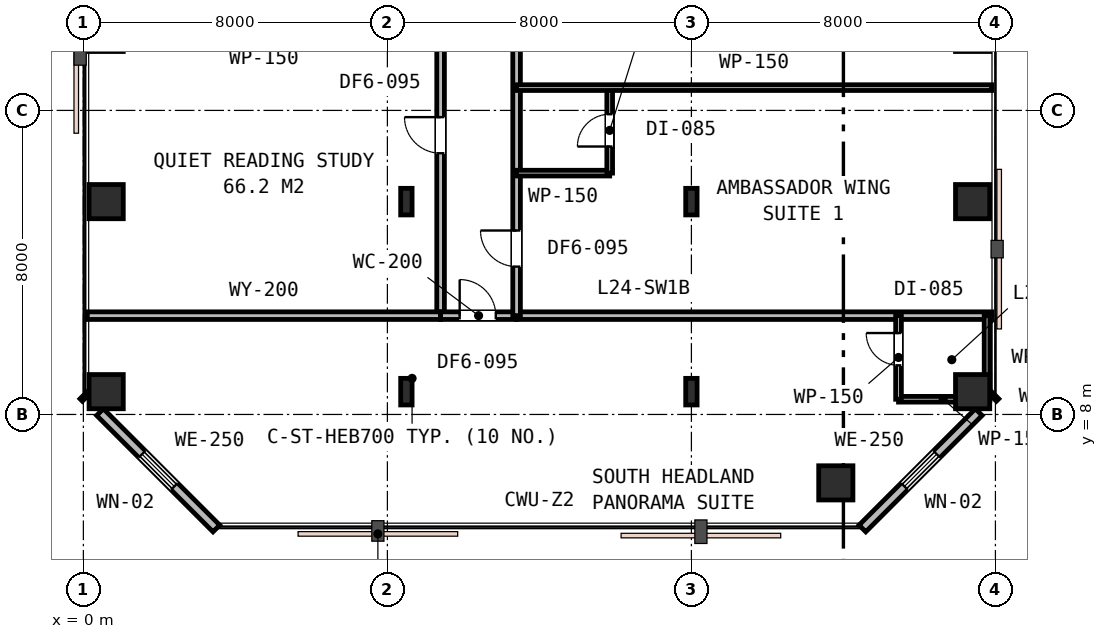
"""IFC4 building model, lengths in metres.
Left out: names, types, materials, properties, quantities, classifications, styles, units other than length and angle.
Written with IfcOpenShell. Run it as: python <this file> out.ifc"""

import sys

from ifc_helpers import new_model, si_unit, direction, frame, frame_2d, origin, origin_2d, place, context, subcontext, project, spatial, rectangle, i_section, extrude, element, fill, save


model = new_model("IFC4")
c1 = context("Model", 3, precision=1e-05, world=origin(), true_north=direction((0.0, 1.0)))
c2 = subcontext(c1, "Body", "Model", "MODEL_VIEW")
j1 = project(units=[si_unit("LENGTHUNIT", "METRE"), si_unit("PLANEANGLEUNIT", "RADIAN")], contexts=[c1])
p1 = place(None, origin())
s1 = spatial("IfcSite", under=j1, at=p1, CompositionType="ELEMENT")
p2 = place(p1, origin())
s2 = spatial("IfcBuilding", under=s1, at=p2, CompositionType="ELEMENT")
p3 = place(p2, frame((0.0, 0.0, 97.2)))
s3 = spatial("IfcBuildingStorey", under=s2, at=p3, CompositionType="ELEMENT", Elevation=97.2)
for number, where, z_axis, x_axis in (
    (1, (0.6, 8.6, 0.0), (0.0, 0.0, 1.0), (1.0, 0.0, 0.0)),
    (2, (0.6, 13.6, 0.0), (0.0, 0.0, 1.0), (1.0, 0.0, 0.0)),
    (3, (19.8, 6.2, 0.0), (0.0, 0.0, 1.0), (1.0, 0.0, 0.0)),
    (4, (23.4, 8.6, 0.0), (0.0, 0.0, 1.0), (1.0, 0.0, 0.0)),
    (5, (23.4, 13.6, 0.0), (0.0, 0.0, 1.0), (1.0, 0.0, 0.0)),
):
    element("IfcColumn", number, at=place(p3, frame(where, z_axis=z_axis, x_axis=x_axis)), inside=s3, PredefinedType="COLUMN", context=c2, shape_type="SweptSolid", body=[
        extrude(rectangle(XDim=0.9, YDim=0.9, at=origin_2d()), origin(), (0.0, 0.0, 1.0), 3.6),
    ])
for number, where, z_axis, x_axis in (
    (6, (8.5, 8.6, 0.0), (0.0, 0.0, 1.0), (1.0, 0.0, 0.0)),
    (7, (16.0, 8.6, 0.0), (0.0, 0.0, 1.0), (1.0, 0.0, 0.0)),
    (8, (8.5, 13.6, 0.0), (0.0, 0.0, 1.0), (1.0, 0.0, 0.0)),
    (9, (16.0, 13.6, 0.0), (0.0, 0.0, 1.0), (1.0, 0.0, 0.0)),
):
    element("IfcColumn", number, at=place(p3, frame(where, z_axis=z_axis, x_axis=x_axis)), inside=s3, PredefinedType="COLUMN", context=c2, shape_type="SweptSolid", body=[
        extrude(i_section(OverallWidth=0.3, OverallDepth=0.7, WebThickness=0.017, FlangeThickness=0.032, FilletRadius=0.027, at=origin_2d()), origin(), (0.0, 0.0, 1.0), 3.6),
    ])
p4 = place(p3, frame((20.5, 5.0, 0.0), z_axis=(0.0, 0.0, 1.0), x_axis=(0.707106781187, 0.707106781187, 0.0)))
e10 = element("IfcWall", 10, at=p4, inside=s3, PredefinedType="STANDARD", context=c2, shape_type="SweptSolid", body=[
    extrude(rectangle(XDim=4.33, YDim=0.25, at=frame_2d((2.165, 0.0))), origin(), (0.0, 0.0, 1.0), 3.33),
])
p5 = place(p4, frame((1.565, 0.0, 0.85)))
e11 = element("IfcOpeningElement", 11, at=p5, cuts=e10, PredefinedType="OPENING", context=c2, shape_type="SweptSolid", body=[
    extrude(rectangle(XDim=1.2, YDim=1.6, at=frame_2d((0.6, 0.8))), frame((0.0, 0.135, 0.0), z_axis=(0.0, -1.0, 0.0), x_axis=(1.0, 0.0, 0.0)), (0.0, 0.0, 1.0), 0.27),
])
for number, where, z_axis, x_axis in (
    (12, (23.938, 8.438, 0.0), (0.0, 0.0, 1.0), (0.707, 0.707, 0.0)),
    (13, (0.0, 8.5, 0.0), (0.0, 0.0, 1.0), (0.707, -0.707, 0.0)),
):
    element("IfcWall", number, at=place(p3, frame(where, z_axis=z_axis, x_axis=x_axis)), inside=s3, PredefinedType="STANDARD", context=c2, shape_type="SweptSolid", body=[
        extrude(rectangle(XDim=0.087, YDim=0.25, at=frame_2d((0.044, 0.0))), origin(), (0.0, 0.0, 1.0), 3.33),
    ])
p6 = place(p3, frame((0.438, 8.062, 0.0), z_axis=(0.0, 0.0, 1.0), x_axis=(0.707106781187, -0.707106781187, 0.0)))
e14 = element("IfcWall", 14, at=p6, inside=s3, PredefinedType="STANDARD", context=c2, shape_type="SweptSolid", body=[
    extrude(rectangle(XDim=4.33, YDim=0.25, at=frame_2d((2.165, 0.0))), origin(), (0.0, 0.0, 1.0), 3.33),
])
p7 = place(p6, frame((1.565, 0.0, 0.85)))
e15 = element("IfcOpeningElement", 15, at=p7, cuts=e14, PredefinedType="OPENING", context=c2, shape_type="SweptSolid", body=[
    extrude(rectangle(XDim=1.2, YDim=1.6, at=frame_2d((0.6, 0.8))), frame((0.0, 0.135, 0.0), z_axis=(0.0, -1.0, 0.0), x_axis=(1.0, 0.0, 0.0)), (0.0, 0.0, 1.0), 0.27),
])
p8 = place(p3, frame((9.4, 10.6, 0.0), z_axis=(0.0, 0.0, 1.0), x_axis=(0.0, 1.0, 0.0)))
e16 = element("IfcWall", 16, at=p8, inside=s3, PredefinedType="PARTITIONING", context=c2, shape_type="SweptSolid", body=[
    extrude(rectangle(XDim=30.9, YDim=0.2, at=frame_2d((15.45, 0.0))), origin(), (0.0, 0.0, 1.0), 2.83),
])
p9 = place(p8, frame((8.679, 0.0, 0.0)))
e17 = element("IfcOpeningElement", 17, at=p9, cuts=e16, PredefinedType="OPENING", context=c2, shape_type="SweptSolid", body=[
    extrude(rectangle(XDim=0.95, YDim=2.15, at=frame_2d((0.475, 1.075))), frame((0.0, 0.11, 0.0), z_axis=(0.0, -1.0, 0.0), x_axis=(1.0, 0.0, 0.0)), (0.0, 0.0, 1.0), 0.22),
])
p10 = place(p8, frame((14.68, 0.0, 0.0)))
e18 = element("IfcOpeningElement", 18, at=p10, cuts=e16, PredefinedType="OPENING", context=c2, shape_type="SweptSolid", body=[
    extrude(rectangle(XDim=0.95, YDim=2.15, at=frame_2d((0.475, 1.075))), frame((0.0, 0.11, 0.0), z_axis=(0.0, -1.0, 0.0), x_axis=(1.0, 0.0, 0.0)), (0.0, 0.0, 1.0), 0.22),
])
p11 = place(p8, frame((4.273, 0.0, 0.0)))
e19 = element("IfcOpeningElement", 19, at=p11, cuts=e16, PredefinedType="OPENING", context=c2, shape_type="SweptSolid", body=[
    extrude(rectangle(XDim=0.95, YDim=2.15, at=frame_2d((0.475, 1.075))), frame((0.0, 0.11, 0.0), z_axis=(0.0, -1.0, 0.0), x_axis=(1.0, 0.0, 0.0)), (0.0, 0.0, 1.0), 0.22),
])
p12 = place(p8, frame((25.745, 0.0, 0.0)))
e20 = element("IfcOpeningElement", 20, at=p12, cuts=e16, PredefinedType="OPENING", context=c2, shape_type="SweptSolid", body=[
    extrude(rectangle(XDim=0.95, YDim=2.15, at=frame_2d((0.475, 1.075))), frame((0.0, 0.11, 0.0), z_axis=(0.0, -1.0, 0.0), x_axis=(1.0, 0.0, 0.0)), (0.0, 0.0, 1.0), 0.22),
])
p13 = place(p3, frame((0.1, 10.6, 0.0), z_axis=(0.0, 0.0, 1.0), x_axis=(1.0, 0.0, 0.0)))
e21 = element("IfcWall", 21, at=p13, inside=s3, PredefinedType="PARTITIONING", context=c2, shape_type="SweptSolid", body=[
    extrude(rectangle(XDim=9.3, YDim=0.2, at=frame_2d((4.65, 0.0))), origin(), (0.0, 0.0, 1.0), 2.83),
])
p14 = place(p3, frame((11.4, 10.6, 0.0), z_axis=(0.0, 0.0, 1.0), x_axis=(1.0, 0.0, 0.0)))
e22 = element("IfcWall", 22, at=p14, inside=s3, PredefinedType="PARTITIONING", context=c2, shape_type="SweptSolid", body=[
    extrude(rectangle(XDim=12.5, YDim=0.2, at=frame_2d((6.25, 0.0))), origin(), (0.0, 0.0, 1.0), 2.83),
])
p15 = place(p3, frame((9.4, 10.6, 0.0), z_axis=(0.0, 0.0, 1.0), x_axis=(1.0, 0.0, 0.0)))
e23 = element("IfcWall", 23, at=p15, inside=s3, PredefinedType="PARTITIONING", context=c2, shape_type="SweptSolid", body=[
    extrude(rectangle(XDim=2.0, YDim=0.2, at=frame_2d((1.0, 0.0))), origin(), (0.0, 0.0, 1.0), 3.02),
])
p16 = place(p15, frame((0.502, 0.0, 0.0)))
e24 = element("IfcOpeningElement", 24, at=p16, cuts=e23, PredefinedType="OPENING", context=c2, shape_type="SweptSolid", body=[
    extrude(rectangle(XDim=0.95, YDim=2.15, at=frame_2d((0.475, 1.075))), frame((0.0, 0.11, 0.0), z_axis=(0.0, -1.0, 0.0), x_axis=(1.0, 0.0, 0.0)), (0.0, 0.0, 1.0), 0.22),
])
p17 = place(p3, frame((21.45, 8.4, 0.0), z_axis=(0.0, 0.0, 1.0), x_axis=(1.0, 0.0, 0.0)))
e25 = element("IfcWall", 25, at=p17, inside=s3, PredefinedType="PARTITIONING", context=c2, shape_type="SweptSolid", body=[
    extrude(rectangle(XDim=2.35, YDim=0.15, at=frame_2d((1.175, 0.0))), origin(), (0.0, 0.0, 1.0), 2.83),
])
p18 = place(p3, frame((21.45, 8.4, 0.0), z_axis=(0.0, 0.0, 1.0), x_axis=(0.0, 1.0, 0.0)))
e26 = element("IfcWall", 26, at=p18, inside=s3, PredefinedType="PARTITIONING", context=c2, shape_type="SweptSolid", body=[
    extrude(rectangle(XDim=2.2, YDim=0.15, at=frame_2d((1.1, 0.0))), origin(), (0.0, 0.0, 1.0), 2.83),
])
p19 = place(p18, frame((0.892, 0.0, 0.0)))
e27 = element("IfcOpeningElement", 27, at=p19, cuts=e26, PredefinedType="OPENING", context=c2, shape_type="SweptSolid", body=[
    extrude(rectangle(XDim=0.85, YDim=2.15, at=frame_2d((0.425, 1.075))), frame((0.0, 0.085, 0.0), z_axis=(0.0, -1.0, 0.0), x_axis=(1.0, 0.0, 0.0)), (0.0, 0.0, 1.0), 0.17),
])
p20 = place(p3, frame((23.78, 10.6, 0.0), z_axis=(0.0, 0.0, 1.0), x_axis=(0.0, -1.0, 0.0)))
e28 = element("IfcWall", 28, at=p20, inside=s3, PredefinedType="PARTITIONING", context=c2, shape_type="SweptSolid", body=[
    extrude(rectangle(XDim=2.22, YDim=0.15, at=frame_2d((1.11, 0.0))), origin(), (0.0, 0.0, 1.0), 2.83),
])
p21 = place(p3, frame((11.4, 10.6, 0.0), z_axis=(0.0, 0.0, 1.0), x_axis=(0.0, 1.0, 0.0)))
e29 = element("IfcWall", 29, at=p21, inside=s3, PredefinedType="PARTITIONING", context=c2, shape_type="SweptSolid", body=[
    extrude(rectangle(XDim=18.0, YDim=0.2, at=frame_2d((9.0, 0.0))), origin(), (0.0, 0.0, 1.0), 2.83),
])
p22 = place(p21, frame((1.29, 0.0, 0.0)))
e30 = element("IfcOpeningElement", 30, at=p22, cuts=e29, PredefinedType="OPENING", context=c2, shape_type="SweptSolid", body=[
    extrude(rectangle(XDim=0.95, YDim=2.15, at=frame_2d((0.475, 1.075))), frame((0.0, 0.11, 0.0), z_axis=(0.0, -1.0, 0.0), x_axis=(1.0, 0.0, 0.0)), (0.0, 0.0, 1.0), 0.22),
])
p23 = place(p21, frame((7.29, 0.0, 0.0)))
e31 = element("IfcOpeningElement", 31, at=p23, cuts=e29, PredefinedType="OPENING", context=c2, shape_type="SweptSolid", body=[
    extrude(rectangle(XDim=0.95, YDim=2.15, at=frame_2d((0.475, 1.075))), frame((0.0, 0.11, 0.0), z_axis=(0.0, -1.0, 0.0), x_axis=(1.0, 0.0, 0.0)), (0.0, 0.0, 1.0), 0.22),
])
p24 = place(p21, frame((13.29, 0.0, 0.0)))
e32 = element("IfcOpeningElement", 32, at=p24, cuts=e29, PredefinedType="OPENING", context=c2, shape_type="SweptSolid", body=[
    extrude(rectangle(XDim=0.95, YDim=2.15, at=frame_2d((0.475, 1.075))), frame((0.0, 0.11, 0.0), z_axis=(0.0, -1.0, 0.0), x_axis=(1.0, 0.0, 0.0)), (0.0, 0.0, 1.0), 0.22),
])
p25 = place(p3, frame((11.4, 14.35, 0.0), z_axis=(0.0, 0.0, 1.0), x_axis=(1.0, 0.0, 0.0)))
e33 = element("IfcWall", 33, at=p25, inside=s3, PredefinedType="PARTITIONING", context=c2, shape_type="SweptSolid", body=[
    extrude(rectangle(XDim=2.45, YDim=0.15, at=frame_2d((1.225, 0.0))), origin(), (0.0, 0.0, 1.0), 3.02),
])
p26 = place(p3, frame((13.85, 14.35, 0.0), z_axis=(0.0, 0.0, 1.0), x_axis=(0.0, 1.0, 0.0)))
e34 = element("IfcWall", 34, at=p26, inside=s3, PredefinedType="PARTITIONING", context=c2, shape_type="SweptSolid", body=[
    extrude(rectangle(XDim=2.25, YDim=0.15, at=frame_2d((1.125, 0.0))), origin(), (0.0, 0.0, 1.0), 3.02),
])
p27 = place(p26, frame((0.7, 0.0, 0.0)))
e35 = element("IfcOpeningElement", 35, at=p27, cuts=e34, PredefinedType="OPENING", context=c2, shape_type="SweptSolid", body=[
    extrude(rectangle(XDim=0.85, YDim=2.15, at=frame_2d((0.425, 1.075))), frame((0.0, 0.085, 0.0), z_axis=(0.0, -1.0, 0.0), x_axis=(1.0, 0.0, 0.0)), (0.0, 0.0, 1.0), 0.17),
])
p28 = place(p3, frame((11.4, 16.6, 0.0), z_axis=(0.0, 0.0, 1.0), x_axis=(1.0, 0.0, 0.0)))
e36 = element("IfcWall", 36, at=p28, inside=s3, PredefinedType="PARTITIONING", context=c2, shape_type="SweptSolid", body=[
    extrude(rectangle(XDim=12.5, YDim=0.15, at=frame_2d((6.25, 0.0))), origin(), (0.0, 0.0, 1.0), 2.83),
])
p29 = place(p5, origin())
e37 = element("IfcWindow", 37, at=p29, inside=s3, PartitioningType="SINGLE_PANEL", PredefinedType="WINDOW", context=c2, shape_type="SweptSolid", body=[
    extrude(rectangle(XDim=1.2, YDim=1.6, at=frame_2d((0.6, 0.8))), frame((0.0, 0.03, 0.0), z_axis=(0.0, -1.0, 0.0), x_axis=(1.0, 0.0, 0.0)), (0.0, 0.0, 1.0), 0.06),
])
fill(e11, e37)
p30 = place(p7, origin())
e38 = element("IfcWindow", 38, at=p30, inside=s3, PartitioningType="SINGLE_PANEL", PredefinedType="WINDOW", context=c2, shape_type="SweptSolid", body=[
    extrude(rectangle(XDim=1.2, YDim=1.6, at=frame_2d((0.6, 0.8))), frame((0.0, 0.03, 0.0), z_axis=(0.0, -1.0, 0.0), x_axis=(1.0, 0.0, 0.0)), (0.0, 0.0, 1.0), 0.06),
])
fill(e15, e38)
p31 = place(p11, origin())
e39 = element("IfcDoor", 39, at=p31, inside=s3, OperationType="SINGLE_SWING_RIGHT", PredefinedType="DOOR", context=c2, shape_type="SweptSolid", body=[
    extrude(rectangle(XDim=0.95, YDim=2.15, at=frame_2d((0.475, 1.075))), frame((0.0, 0.025, 0.0), z_axis=(0.0, -1.0, 0.0), x_axis=(1.0, 0.0, 0.0)), (0.0, 0.0, 1.0), 0.05),
])
fill(e19, e39)
p32 = place(p16, origin())
e40 = element("IfcDoor", 40, at=p32, inside=s3, OperationType="SINGLE_SWING_LEFT", PredefinedType="DOOR", context=c2, shape_type="SweptSolid", body=[
    extrude(rectangle(XDim=0.95, YDim=2.15, at=frame_2d((0.475, 1.075))), frame((0.0, 0.025, 0.0), z_axis=(0.0, -1.0, 0.0), x_axis=(1.0, 0.0, 0.0)), (0.0, 0.0, 1.0), 0.05),
])
fill(e24, e40)
p33 = place(p19, origin())
e41 = element("IfcDoor", 41, at=p33, inside=s3, OperationType="SINGLE_SWING_RIGHT", PredefinedType="DOOR", context=c2, shape_type="SweptSolid", body=[
    extrude(rectangle(XDim=0.85, YDim=2.15, at=frame_2d((0.425, 1.075))), frame((0.0, 0.025, 0.0), z_axis=(0.0, -1.0, 0.0), x_axis=(1.0, 0.0, 0.0)), (0.0, 0.0, 1.0), 0.05),
])
fill(e27, e41)
p34 = place(p22, origin())
e42 = element("IfcDoor", 42, at=p34, inside=s3, OperationType="SINGLE_SWING_RIGHT", PredefinedType="DOOR", context=c2, shape_type="SweptSolid", body=[
    extrude(rectangle(XDim=0.95, YDim=2.15, at=frame_2d((0.475, 1.075))), frame((0.0, 0.025, 0.0), z_axis=(0.0, -1.0, 0.0), x_axis=(1.0, 0.0, 0.0)), (0.0, 0.0, 1.0), 0.05),
])
fill(e30, e42)
p35 = place(p27, origin())
e43 = element("IfcDoor", 43, at=p35, inside=s3, OperationType="SINGLE_SWING_LEFT", PredefinedType="DOOR", context=c2, shape_type="SweptSolid", body=[
    extrude(rectangle(XDim=0.85, YDim=2.15, at=frame_2d((0.425, 1.075))), frame((0.0, 0.025, 0.0), z_axis=(0.0, -1.0, 0.0), x_axis=(1.0, 0.0, 0.0)), (0.0, 0.0, 1.0), 0.05),
])
fill(e35, e43)
save(model, sys.argv[1])
